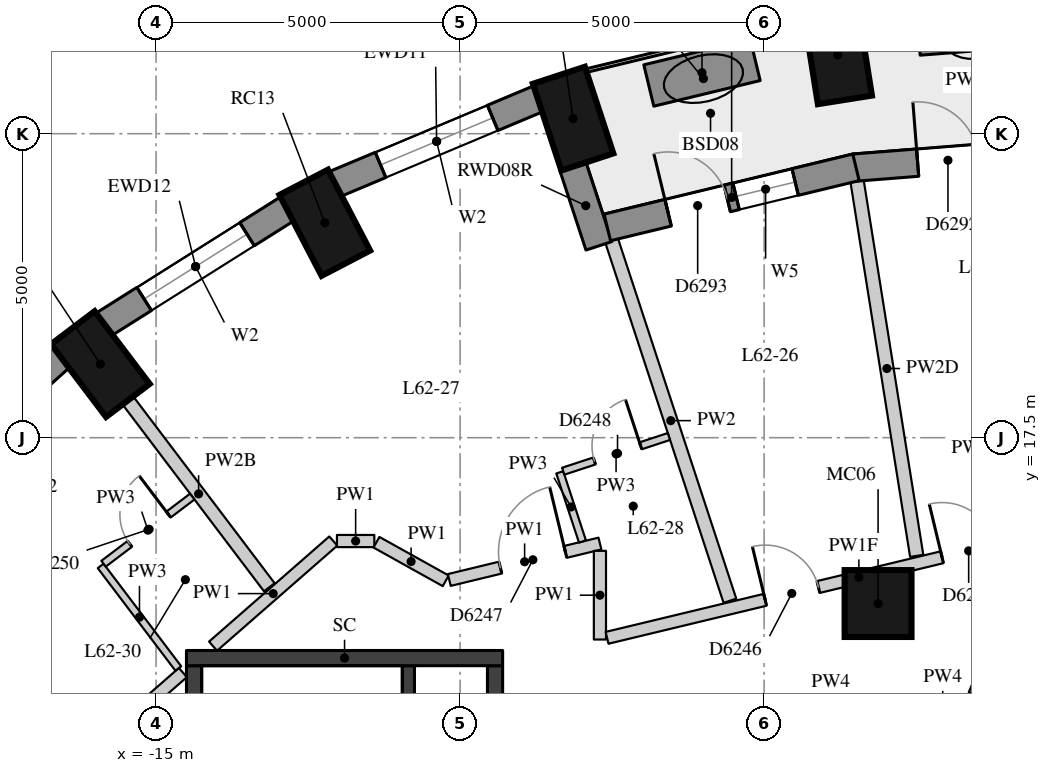
"""IFC4 building model, lengths in metres.
Left out: names, types, materials, properties, quantities, classifications, styles, units other than length and angle.
Written with IfcOpenShell. Run it as: python <this file> out.ifc"""

import sys

from ifc_helpers import new_model, si_unit, direction, frame, frame_2d, origin, origin_2d, place, context, subcontext, project, spatial, rectangle, extrude, element, fill, save


model = new_model("IFC4")
c1 = context("Model", 3, precision=1e-05, world=origin(), true_north=direction((0.0, 1.0)))
c2 = subcontext(c1, "Body", "Model", "MODEL_VIEW")
j1 = project(units=[si_unit("LENGTHUNIT", "METRE"), si_unit("PLANEANGLEUNIT", "RADIAN")], contexts=[c1])
p1 = place(None, origin())
s1 = spatial("IfcSite", under=j1, at=p1, CompositionType="ELEMENT")
p2 = place(p1, origin())
s2 = spatial("IfcBuilding", under=s1, at=p2, CompositionType="ELEMENT")
p3 = place(p2, frame((0.0, 0.0, 218.9)))
s3 = spatial("IfcBuildingStorey", under=s2, at=p3, CompositionType="ELEMENT", Elevation=218.9)
for number, where, z_axis, x_axis in (
    (1, (-3.789, 23.797, 0.0), (0.0, 0.0, 1.0), (-0.157, 0.988, 0.0)),
    (2, (-8.141, 22.748, 0.0), (0.0, 0.0, 1.0), (-0.312, 0.95, 0.0)),
    (3, (-12.225, 21.035, 0.0), (0.0, 0.0, 1.0), (-0.462, 0.887, 0.0)),
    (4, (-15.916, 18.71, 0.0), (0.0, 0.0, 1.0), (-0.604, 0.797, 0.0)),
):
    element("IfcColumn", number, at=place(p3, frame(where, z_axis=z_axis, x_axis=x_axis)), inside=s3, PredefinedType="COLUMN", context=c2, shape_type="SweptSolid", body=[
        extrude(rectangle(XDim=1.5, YDim=0.9, at=origin_2d()), origin(), (0.0, 0.0, 1.0), 3.3),
    ])
p4 = place(p3, frame((-3.126, 14.772, 0.0), z_axis=(0.0, 0.0, 1.0), x_axis=(1.0, 0.0, 0.0)))
e5 = element("IfcColumn", 5, at=p4, inside=s3, PredefinedType="COLUMN", context=c2, shape_type="SweptSolid", body=[
    extrude(rectangle(XDim=1.1, YDim=1.1, at=origin_2d()), origin(), (0.0, 0.0, 1.0), 3.3),
])
p5 = place(p3, frame((-8.703, 23.079, 0.0), z_axis=(0.0, 0.0, 1.0), x_axis=(-0.922168222612, -0.386789050006, 0.0)))
e6 = element("IfcWall", 6, at=p5, inside=s3, PredefinedType="SOLIDWALL", context=c2, shape_type="SweptSolid", body=[
    extrude(rectangle(XDim=3.651, YDim=0.45, at=frame_2d((1.825, 0.0))), origin(), (0.0, 0.0, 1.0), 3.02),
])
p6 = place(p5, frame((0.825, 0.0, 0.4)))
e7 = element("IfcOpeningElement", 7, at=p6, cuts=e6, PredefinedType="OPENING", context=c2, shape_type="SweptSolid", body=[
    extrude(rectangle(XDim=2.0, YDim=1.75, at=frame_2d((1.0, 0.875))), frame((0.0, 0.235, 0.0), z_axis=(0.0, -1.0, 0.0), x_axis=(1.0, 0.0, 0.0)), (0.0, 0.0, 1.0), 0.47),
])
p7 = place(p3, frame((-12.832, 21.27, 0.0), z_axis=(0.0, 0.0, 1.0), x_axis=(-0.846138482752, -0.532963101918, 0.0)))
e8 = element("IfcWall", 8, at=p7, inside=s3, PredefinedType="SOLIDWALL", context=c2, shape_type="SweptSolid", body=[
    extrude(rectangle(XDim=3.587, YDim=0.45, at=frame_2d((1.793, 0.0))), origin(), (0.0, 0.0, 1.0), 3.02),
])
p8 = place(p7, frame((0.793, 0.0, 0.4)))
e9 = element("IfcOpeningElement", 9, at=p8, cuts=e8, PredefinedType="OPENING", context=c2, shape_type="SweptSolid", body=[
    extrude(rectangle(XDim=2.0, YDim=1.75, at=frame_2d((1.0, 0.875))), frame((0.0, 0.235, 0.0), z_axis=(0.0, -1.0, 0.0), x_axis=(1.0, 0.0, 0.0)), (0.0, 0.0, 1.0), 0.47),
])
p9 = place(p3, frame((-16.553, 18.84, 0.0), z_axis=(0.0, 0.0, 1.0), x_axis=(-0.743442727602, -0.668799604348, 0.0)))
e10 = element("IfcWall", 10, at=p9, inside=s3, PredefinedType="SOLIDWALL", context=c2, shape_type="SweptSolid", body=[
    extrude(rectangle(XDim=3.513, YDim=0.45, at=frame_2d((1.756, 0.0))), origin(), (0.0, 0.0, 1.0), 3.02),
])
p10 = place(p9, frame((0.756, 0.0, 0.4)))
e11 = element("IfcOpeningElement", 11, at=p10, cuts=e10, PredefinedType="OPENING", context=c2, shape_type="SweptSolid", body=[
    extrude(rectangle(XDim=2.0, YDim=1.75, at=frame_2d((1.0, 0.875))), frame((0.0, 0.235, 0.0), z_axis=(0.0, -1.0, 0.0), x_axis=(1.0, 0.0, 0.0)), (0.0, 0.0, 1.0), 0.47),
])
p11 = place(p3, frame((-8.15, 21.977, 0.0), z_axis=(0.0, 0.0, 1.0), x_axis=(0.312062715826, -0.950061504005, 0.0)))
e12 = element("IfcWall", 12, at=p11, inside=s3, PredefinedType="SOLIDWALL", context=c2, shape_type="SweptSolid", body=[
    extrude(rectangle(XDim=1.39, YDim=0.45, at=frame_2d((0.695, 0.0))), origin(), (0.0, 0.0, 1.0), 3.02),
])
p12 = place(p3, frame((0.718, 22.276, 0.0), z_axis=(0.0, 0.0, 1.0), x_axis=(-0.996901346333, -0.078661970983, 0.0)))
e13 = element("IfcWall", 13, at=p12, inside=s3, PredefinedType="SOLIDWALL", context=c2, shape_type="SweptSolid", body=[
    extrude(rectangle(XDim=4.255, YDim=0.45, at=frame_2d((2.127, 0.0))), origin(), (0.0, 0.0, 1.0), 3.02),
])
p13 = place(p12, frame((1.052, 0.0, 0.4)))
e14 = element("IfcOpeningElement", 14, at=p13, cuts=e13, PredefinedType="OPENING", context=c2, shape_type="SweptSolid", body=[
    extrude(rectangle(XDim=1.0, YDim=1.75, at=frame_2d((0.5, 0.875))), frame((0.0, 0.235, 0.0), z_axis=(0.0, -1.0, 0.0), x_axis=(1.0, 0.0, 0.0)), (0.0, 0.0, 1.0), 0.47),
])
p14 = place(p12, frame((2.203, 0.0, 0.0)))
e15 = element("IfcOpeningElement", 15, at=p14, cuts=e13, PredefinedType="OPENING", context=c2, shape_type="SweptSolid", body=[
    extrude(rectangle(XDim=1.0, YDim=2.15, at=frame_2d((0.5, 1.075))), frame((0.0, 0.235, 0.0), z_axis=(0.0, -1.0, 0.0), x_axis=(1.0, 0.0, 0.0)), (0.0, 0.0, 1.0), 0.47),
])
p15 = place(p3, frame((-3.489, 21.947, 0.0), z_axis=(0.0, 0.0, 1.0), x_axis=(-0.972007311035, -0.234950606076, 0.0)))
e16 = element("IfcWall", 16, at=p15, inside=s3, PredefinedType="SOLIDWALL", context=c2, shape_type="SweptSolid", body=[
    extrude(rectangle(XDim=4.207, YDim=0.45, at=frame_2d((2.104, 0.0))), origin(), (0.0, 0.0, 1.0), 3.02),
])
p16 = place(p15, frame((1.029, 0.0, 0.4)))
e17 = element("IfcOpeningElement", 17, at=p16, cuts=e16, PredefinedType="OPENING", context=c2, shape_type="SweptSolid", body=[
    extrude(rectangle(XDim=1.0, YDim=1.75, at=frame_2d((0.5, 0.875))), frame((0.0, 0.235, 0.0), z_axis=(0.0, -1.0, 0.0), x_axis=(1.0, 0.0, 0.0)), (0.0, 0.0, 1.0), 0.47),
])
p17 = place(p15, frame((2.179, 0.0, 0.0)))
e18 = element("IfcOpeningElement", 18, at=p17, cuts=e16, PredefinedType="OPENING", context=c2, shape_type="SweptSolid", body=[
    extrude(rectangle(XDim=1.0, YDim=2.15, at=frame_2d((0.5, 1.075))), frame((0.0, 0.235, 0.0), z_axis=(0.0, -1.0, 0.0), x_axis=(1.0, 0.0, 0.0)), (0.0, 0.0, 1.0), 0.47),
])
p18 = place(p3, frame((-0.666, 24.281, 0.0), z_axis=(0.0, 0.0, 1.0), x_axis=(-0.996911576184, -0.078532218042, 0.0)))
e19 = element("IfcWall", 19, at=p18, inside=s3, PredefinedType="USERDEFINED", context=c2, shape_type="SweptSolid", body=[
    extrude(rectangle(XDim=1.8, YDim=0.7, at=frame_2d((0.9, 0.0))), origin(), (0.0, 0.0, 1.0), 0.75),
])
p19 = place(p3, frame((-5.146, 23.714, 0.0), z_axis=(0.0, 0.0, 1.0), x_axis=(-0.972142986016, -0.234388597717, 0.0)))
e20 = element("IfcWall", 20, at=p19, inside=s3, PredefinedType="USERDEFINED", context=c2, shape_type="SweptSolid", body=[
    extrude(rectangle(XDim=1.8, YDim=0.7, at=frame_2d((0.9, 0.0))), origin(), (0.0, 0.0, 1.0), 0.75),
])
p20 = place(p3, frame((-10.85, 7.75, 0.0), z_axis=(0.0, 0.0, 1.0), x_axis=(0.0, 1.0, 0.0)))
e21 = element("IfcWall", 21, at=p20, inside=s3, PredefinedType="SHEAR", context=c2, shape_type="SweptSolid", body=[
    extrude(rectangle(XDim=6.0, YDim=0.2, at=frame_2d((3.0, 0.0))), origin(), (0.0, 0.0, 1.0), 3.02),
])
p21 = place(p20, frame((0.1, 0.0, 0.0)))
e22 = element("IfcOpeningElement", 22, at=p21, cuts=e21, PredefinedType="OPENING", context=c2, shape_type="SweptSolid", body=[
    extrude(rectangle(XDim=1.5, YDim=2.1, at=frame_2d((0.75, 1.05))), frame((0.0, 0.11, 0.0), z_axis=(0.0, -1.0, 0.0), x_axis=(1.0, 0.0, 0.0)), (0.0, 0.0, 1.0), 0.22),
])
p22 = place(p3, frame((-14.375, 7.75, -0.28), z_axis=(0.0, 0.0, 1.0), x_axis=(0.0, 1.0, 0.0)))
e23 = element("IfcWall", 23, at=p22, inside=s3, PredefinedType="SHEAR", context=c2, shape_type="SweptSolid", body=[
    extrude(rectangle(XDim=6.0, YDim=0.25, at=frame_2d((3.0, 0.0))), origin(), (0.0, 0.0, 1.0), 3.3),
])
p23 = place(p3, frame((-9.425, 7.75, -0.28), z_axis=(0.0, 0.0, 1.0), x_axis=(0.0, 1.0, 0.0)))
e24 = element("IfcWall", 24, at=p23, inside=s3, PredefinedType="SHEAR", context=c2, shape_type="SweptSolid", body=[
    extrude(rectangle(XDim=6.0, YDim=0.25, at=frame_2d((3.0, 0.0))), origin(), (0.0, 0.0, 1.0), 3.3),
])
p24 = place(p23, frame((2.1, 0.0, 0.28)))
e25 = element("IfcOpeningElement", 25, at=p24, cuts=e24, PredefinedType="OPENING", context=c2, shape_type="SweptSolid", body=[
    extrude(rectangle(XDim=1.5, YDim=2.1, at=frame_2d((0.75, 1.05))), frame((0.0, 0.135, 0.0), z_axis=(0.0, -1.0, 0.0), x_axis=(1.0, 0.0, 0.0)), (0.0, 0.0, 1.0), 0.27),
])
p25 = place(p3, frame((-14.5, 13.875, -0.28), z_axis=(0.0, 0.0, 1.0), x_axis=(1.0, 0.0, 0.0)))
e26 = element("IfcWall", 26, at=p25, inside=s3, PredefinedType="SHEAR", context=c2, shape_type="SweptSolid", body=[
    extrude(rectangle(XDim=5.2, YDim=0.25, at=frame_2d((2.6, 0.0))), origin(), (0.0, 0.0, 1.0), 3.3),
])
p26 = place(p3, frame((-16.24, 12.168, 0.0), z_axis=(0.0, 0.0, 1.0), x_axis=(0.752820521129, 0.658225844956, 0.0)))
e27 = element("IfcWall", 27, at=p26, inside=s3, PredefinedType="PARTITIONING", context=c2, shape_type="SweptSolid", body=[
    extrude(rectangle(XDim=2.232, YDim=0.2, at=frame_2d((1.116, 0.0))), origin(), (0.0, 0.0, 1.0), 3.02),
])
p27 = place(p3, frame((-14.063, 14.071, 0.0), z_axis=(0.0, 0.0, 1.0), x_axis=(0.752870230185, 0.6581689878, 0.0)))
e28 = element("IfcWall", 28, at=p27, inside=s3, PredefinedType="PARTITIONING", context=c2, shape_type="SweptSolid", body=[
    extrude(rectangle(XDim=2.627, YDim=0.2, at=frame_2d((1.313, 0.0))), origin(), (0.0, 0.0, 1.0), 3.02),
])
p28 = place(p3, frame((-12.025, 15.8, 0.0), z_axis=(0.0, 0.0, 1.0), x_axis=(1.0, 0.0, 0.0)))
e29 = element("IfcWall", 29, at=p28, inside=s3, PredefinedType="PARTITIONING", context=c2, shape_type="SweptSolid", body=[
    extrude(rectangle(XDim=0.615, YDim=0.2, at=frame_2d((0.307, 0.0))), origin(), (0.0, 0.0, 1.0), 3.02),
])
p29 = place(p3, frame((-11.375, 15.781, 0.0), z_axis=(0.0, 0.0, 1.0), x_axis=(0.873538410035, -0.486755222051, 0.0)))
e30 = element("IfcWall", 30, at=p29, inside=s3, PredefinedType="PARTITIONING", context=c2, shape_type="SweptSolid", body=[
    extrude(rectangle(XDim=1.304, YDim=0.2, at=frame_2d((0.652, 0.0))), origin(), (0.0, 0.0, 1.0), 3.02),
])
p30 = place(p3, frame((-10.177, 15.16, 0.0), z_axis=(0.0, 0.0, 1.0), x_axis=(0.971984190663, 0.235046236094, 0.0)))
e31 = element("IfcWall", 31, at=p30, inside=s3, PredefinedType="PARTITIONING", context=c2, shape_type="SweptSolid", body=[
    extrude(rectangle(XDim=2.549, YDim=0.2, at=frame_2d((1.274, 0.0))), origin(), (0.0, 0.0, 1.0), 3.02),
])
p31 = place(p30, frame((0.865, 0.0, 0.0)))
e32 = element("IfcOpeningElement", 32, at=p31, cuts=e31, PredefinedType="OPENING", context=c2, shape_type="SweptSolid", body=[
    extrude(rectangle(XDim=1.1, YDim=2.1, at=frame_2d((0.55, 1.05))), frame((0.0, 0.11, 0.0), z_axis=(0.0, -1.0, 0.0), x_axis=(1.0, 0.0, 0.0)), (0.0, 0.0, 1.0), 0.22),
])
p32 = place(p3, frame((-7.7, 15.639, 0.0), z_axis=(0.0, 0.0, 1.0), x_axis=(0.0, -1.0, 0.0)))
e33 = element("IfcWall", 33, at=p32, inside=s3, PredefinedType="PARTITIONING", context=c2, shape_type="SweptSolid", body=[
    extrude(rectangle(XDim=1.458, YDim=0.2, at=frame_2d((0.729, 0.0))), origin(), (0.0, 0.0, 1.0), 3.02),
])
p33 = place(p3, frame((-7.583, 14.208, 0.0), z_axis=(0.0, 0.0, 1.0), x_axis=(0.972284712223, 0.233799996531, 0.0)))
e34 = element("IfcWall", 34, at=p33, inside=s3, PredefinedType="PARTITIONING", context=c2, shape_type="SweptSolid", body=[
    extrude(rectangle(XDim=8.519, YDim=0.2, at=frame_2d((4.259, 0.0))), origin(), (0.0, 0.0, 1.0), 2.42),
])
p34 = place(p33, frame((5.667, 0.0, 0.0)))
e35 = element("IfcOpeningElement", 35, at=p34, cuts=e34, PredefinedType="OPENING", context=c2, shape_type="SweptSolid", body=[
    extrude(rectangle(XDim=0.9, YDim=2.1, at=frame_2d((0.45, 1.05))), frame((0.0, 0.11, 0.0), z_axis=(0.0, -1.0, 0.0), x_axis=(1.0, 0.0, 0.0)), (0.0, 0.0, 1.0), 0.22),
])
p35 = place(p33, frame((2.674, 0.0, 0.0)))
e36 = element("IfcOpeningElement", 36, at=p35, cuts=e34, PredefinedType="OPENING", context=c2, shape_type="SweptSolid", body=[
    extrude(rectangle(XDim=0.9, YDim=2.1, at=frame_2d((0.45, 1.05))), frame((0.0, 0.11, 0.0), z_axis=(0.0, -1.0, 0.0), x_axis=(1.0, 0.0, 0.0)), (0.0, 0.0, 1.0), 0.22),
])
p36 = place(p3, frame((-1.563, 13.288, 0.0), z_axis=(0.0, 0.0, 1.0), x_axis=(0.383038417634, 0.923732412886, 0.0)))
e37 = element("IfcWall", 37, at=p36, inside=s3, PredefinedType="PARTITIONING", context=c2, shape_type="SweptSolid", body=[
    extrude(rectangle(XDim=0.869, YDim=0.15, at=frame_2d((0.434, 0.0))), origin(), (0.0, 0.0, 1.0), 3.02),
])
p37 = place(p3, frame((-3.471, 21.719, 0.0), z_axis=(0.0, 0.0, 1.0), x_axis=(0.157105510173, -0.987581823786, 0.0)))
e38 = element("IfcWall", 38, at=p37, inside=s3, PredefinedType="PARTITIONING", context=c2, shape_type="SweptSolid", body=[
    extrude(rectangle(XDim=6.241, YDim=0.22, at=frame_2d((3.12, 0.0))), origin(), (0.0, 0.0, 1.0), 2.47),
])
p38 = place(p3, frame((-7.508, 20.743, 0.0), z_axis=(0.0, 0.0, 1.0), x_axis=(0.311985211021, -0.95008695818, 0.0)))
e39 = element("IfcWall", 39, at=p38, inside=s3, PredefinedType="PARTITIONING", context=c2, shape_type="SweptSolid", body=[
    extrude(rectangle(XDim=6.237, YDim=0.22, at=frame_2d((3.118, 0.0))), origin(), (0.0, 0.0, 1.0), 3.02),
])
p39 = place(p3, frame((-15.463, 18.113, 0.0), z_axis=(0.0, 0.0, 1.0), x_axis=(0.603591792806, -0.79729351412, 0.0)))
e40 = element("IfcWall", 40, at=p39, inside=s3, PredefinedType="PARTITIONING", context=c2, shape_type="SweptSolid", body=[
    extrude(rectangle(XDim=3.854, YDim=0.22, at=frame_2d((1.927, 0.0))), origin(), (0.0, 0.0, 1.0), 2.57),
])
p40 = place(p3, frame((-7.987, 15.792, 0.0), z_axis=(0.0, 0.0, 1.0), x_axis=(-0.312187467963, 0.950020518119, 0.0)))
e41 = element("IfcWall", 41, at=p40, inside=s3, PredefinedType="PARTITIONING", context=c2, shape_type="SweptSolid", body=[
    extrude(rectangle(XDim=1.197, YDim=0.12, at=frame_2d((0.599, 0.0))), origin(), (0.0, 0.0, 1.0), 3.02),
])
p41 = place(p3, frame((-14.634, 13.704, 0.0), z_axis=(0.0, 0.0, 1.0), x_axis=(-0.603613230526, 0.797277284221, 0.0)))
e42 = element("IfcWall", 42, at=p41, inside=s3, PredefinedType="PARTITIONING", context=c2, shape_type="SweptSolid", body=[
    extrude(rectangle(XDim=2.115, YDim=0.12, at=frame_2d((1.058, 0.0))), origin(), (0.0, 0.0, 1.0), 3.02),
])
p42 = place(p3, frame((-8.304, 16.948, 0.0), z_axis=(0.0, 0.0, 1.0), x_axis=(0.95011423119, 0.311902144415, 0.0)))
e43 = element("IfcWall", 43, at=p42, inside=s3, PredefinedType="PARTITIONING", context=c2, shape_type="SweptSolid", body=[
    extrude(rectangle(XDim=1.83, YDim=0.12, at=frame_2d((0.915, 0.0))), origin(), (0.0, 0.0, 1.0), 3.02),
])
p43 = place(p42, frame((0.54, 0.0, 0.0)))
e44 = element("IfcOpeningElement", 44, at=p43, cuts=e43, PredefinedType="OPENING", context=c2, shape_type="SweptSolid", body=[
    extrude(rectangle(XDim=0.8, YDim=2.1, at=frame_2d((0.4, 1.05))), frame((0.0, 0.07, 0.0), z_axis=(0.0, -1.0, 0.0), x_axis=(1.0, 0.0, 0.0)), (0.0, 0.0, 1.0), 0.14),
])
p44 = place(p3, frame((-15.863, 15.427, 0.0), z_axis=(0.0, 0.0, 1.0), x_axis=(0.79730226728, 0.603580230451, 0.0)))
e45 = element("IfcWall", 45, at=p44, inside=s3, PredefinedType="PARTITIONING", context=c2, shape_type="SweptSolid", body=[
    extrude(rectangle(XDim=1.83, YDim=0.12, at=frame_2d((0.915, 0.0))), origin(), (0.0, 0.0, 1.0), 3.02),
])
p45 = place(p44, frame((0.54, 0.0, 0.0)))
e46 = element("IfcOpeningElement", 46, at=p45, cuts=e45, PredefinedType="OPENING", context=c2, shape_type="SweptSolid", body=[
    extrude(rectangle(XDim=0.8, YDim=2.1, at=frame_2d((0.4, 1.05))), frame((0.0, 0.07, 0.0), z_axis=(0.0, -1.0, 0.0), x_axis=(1.0, 0.0, 0.0)), (0.0, 0.0, 1.0), 0.14),
])
p46 = place(p6, origin())
e47 = element("IfcWindow", 47, at=p46, inside=s3, PartitioningType="SINGLE_PANEL", PredefinedType="WINDOW", context=c2, shape_type="SweptSolid", body=[
    extrude(rectangle(XDim=2.0, YDim=1.75, at=frame_2d((1.0, 0.875))), frame((0.0, 0.035, 0.0), z_axis=(0.0, -1.0, 0.0), x_axis=(1.0, 0.0, 0.0)), (0.0, 0.0, 1.0), 0.06),
])
fill(e7, e47)
p47 = place(p8, origin())
e48 = element("IfcWindow", 48, at=p47, inside=s3, PartitioningType="SINGLE_PANEL", PredefinedType="WINDOW", context=c2, shape_type="SweptSolid", body=[
    extrude(rectangle(XDim=2.0, YDim=1.75, at=frame_2d((1.0, 0.875))), frame((0.0, 0.035, 0.0), z_axis=(0.0, -1.0, 0.0), x_axis=(1.0, 0.0, 0.0)), (0.0, 0.0, 1.0), 0.06),
])
fill(e9, e48)
p48 = place(p14, frame((1.0, 0.0, 0.0), z_axis=(0.0, 0.0, 1.0), x_axis=(-1.0, 0.0, 0.0)))
e49 = element("IfcDoor", 49, at=p48, inside=s3, OperationType="SINGLE_SWING_LEFT", PredefinedType="DOOR", context=c2, shape_type="SweptSolid", body=[
    extrude(rectangle(XDim=1.0, YDim=2.15, at=frame_2d((0.5, 1.075))), frame((0.0, 0.075, 0.0), z_axis=(0.0, -1.0, 0.0), x_axis=(1.0, 0.0, 0.0)), (0.0, 0.0, 1.0), 0.05),
])
fill(e15, e49)
p49 = place(p16, origin())
e50 = element("IfcWindow", 50, at=p49, inside=s3, PartitioningType="SINGLE_PANEL", PredefinedType="WINDOW", context=c2, shape_type="SweptSolid", body=[
    extrude(rectangle(XDim=1.0, YDim=1.75, at=frame_2d((0.5, 0.875))), frame((0.0, 0.035, 0.0), z_axis=(0.0, -1.0, 0.0), x_axis=(1.0, 0.0, 0.0)), (0.0, 0.0, 1.0), 0.06),
])
fill(e17, e50)
p50 = place(p17, frame((1.0, 0.0, 0.0), z_axis=(0.0, 0.0, 1.0), x_axis=(-1.0, 0.0, 0.0)))
e51 = element("IfcDoor", 51, at=p50, inside=s3, OperationType="SINGLE_SWING_LEFT", PredefinedType="DOOR", context=c2, shape_type="SweptSolid", body=[
    extrude(rectangle(XDim=1.0, YDim=2.15, at=frame_2d((0.5, 1.075))), frame((0.0, 0.075, 0.0), z_axis=(0.0, -1.0, 0.0), x_axis=(1.0, 0.0, 0.0)), (0.0, 0.0, 1.0), 0.05),
])
fill(e18, e51)
p51 = place(p34, origin())
e52 = element("IfcDoor", 52, at=p51, inside=s3, OperationType="SINGLE_SWING_LEFT", PredefinedType="DOOR", context=c2, shape_type="SweptSolid", body=[
    extrude(rectangle(XDim=0.9, YDim=2.1, at=frame_2d((0.45, 1.05))), frame((0.0, 0.025, 0.0), z_axis=(0.0, -1.0, 0.0), x_axis=(1.0, 0.0, 0.0)), (0.0, 0.0, 1.0), 0.05),
])
fill(e35, e52)
p52 = place(p35, origin())
e53 = element("IfcDoor", 53, at=p52, inside=s3, OperationType="SINGLE_SWING_LEFT", PredefinedType="DOOR", context=c2, shape_type="SweptSolid", body=[
    extrude(rectangle(XDim=0.9, YDim=2.1, at=frame_2d((0.45, 1.05))), frame((0.0, 0.025, 0.0), z_axis=(0.0, -1.0, 0.0), x_axis=(1.0, 0.0, 0.0)), (0.0, 0.0, 1.0), 0.05),
])
fill(e36, e53)
p53 = place(p31, origin())
e54 = element("IfcDoor", 54, at=p53, inside=s3, OperationType="SINGLE_SWING_RIGHT", PredefinedType="DOOR", context=c2, shape_type="SweptSolid", body=[
    extrude(rectangle(XDim=1.1, YDim=2.1, at=frame_2d((0.55, 1.05))), frame((0.0, 0.025, 0.0), z_axis=(0.0, -1.0, 0.0), x_axis=(1.0, 0.0, 0.0)), (0.0, 0.0, 1.0), 0.05),
])
fill(e32, e54)
p54 = place(p43, origin())
e55 = element("IfcDoor", 55, at=p54, inside=s3, OperationType="SINGLE_SWING_RIGHT", PredefinedType="DOOR", context=c2, shape_type="SweptSolid", body=[
    extrude(rectangle(XDim=0.8, YDim=2.1, at=frame_2d((0.4, 1.05))), frame((0.0, 0.025, 0.0), z_axis=(0.0, -1.0, 0.0), x_axis=(1.0, 0.0, 0.0)), (0.0, 0.0, 1.0), 0.05),
])
fill(e44, e55)
p55 = place(p45, origin())
e56 = element("IfcDoor", 56, at=p55, inside=s3, OperationType="SINGLE_SWING_RIGHT", PredefinedType="DOOR", context=c2, shape_type="SweptSolid", body=[
    extrude(rectangle(XDim=0.8, YDim=2.1, at=frame_2d((0.4, 1.05))), frame((0.0, 0.025, 0.0), z_axis=(0.0, -1.0, 0.0), x_axis=(1.0, 0.0, 0.0)), (0.0, 0.0, 1.0), 0.05),
])
fill(e46, e56)
save(model, sys.argv[1])
